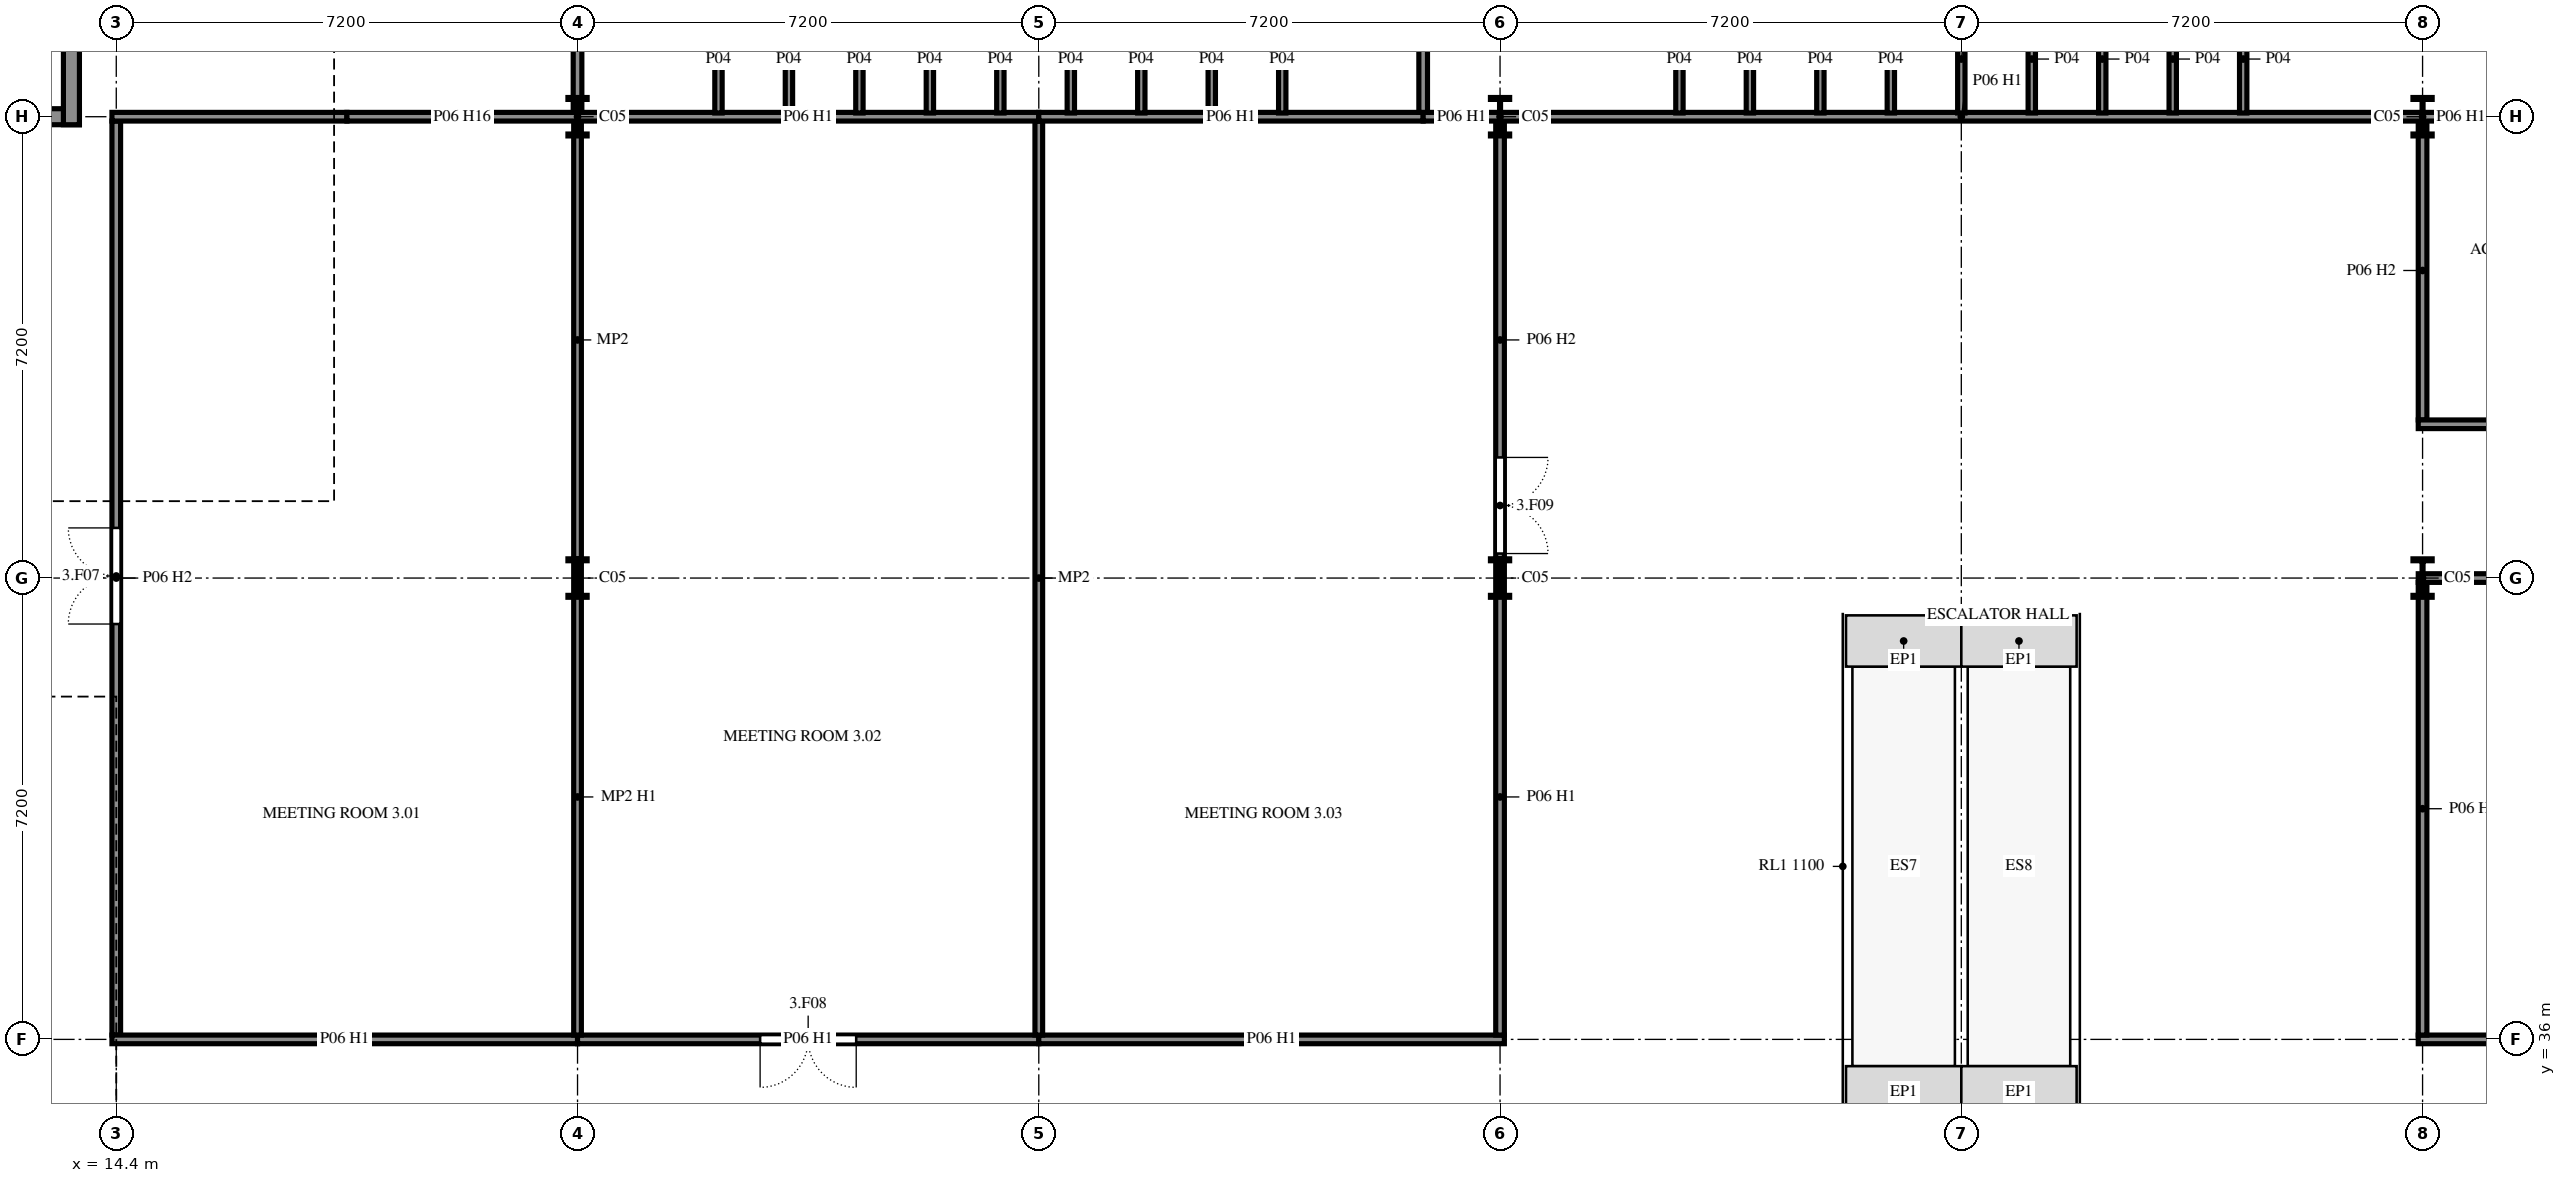
"""IFC4 building model, lengths in metres.
Left out: names, types, materials, properties, quantities, classifications, styles, units other than length and angle.
Written with IfcOpenShell. Run it as: python <this file> out.ifc"""

import sys

from ifc_helpers import new_model, si_unit, direction, frame, frame_2d, origin, origin_2d, place, context, subcontext, project, spatial, rectangle, i_section, extrude, element, fill, save


model = new_model("IFC4")
c1 = context("Model", 3, precision=1e-05, world=origin(), true_north=direction((0.0, 1.0)))
c2 = subcontext(c1, "Body", "Model", "MODEL_VIEW")
j1 = project(units=[si_unit("LENGTHUNIT", "METRE"), si_unit("PLANEANGLEUNIT", "RADIAN")], contexts=[c1])
p1 = place(None, origin())
s1 = spatial("IfcSite", under=j1, at=p1, CompositionType="ELEMENT")
p2 = place(p1, origin())
s2 = spatial("IfcBuilding", under=s1, at=p2, CompositionType="ELEMENT")
p3 = place(p2, frame((0.0, 0.0, 10.8)))
s3 = spatial("IfcBuildingStorey", under=s2, at=p3, CompositionType="ELEMENT", Elevation=10.8)
for number, where, z_axis, x_axis in (
    (1, (21.6, 43.2, 0.0), (0.0, 0.0, 1.0), (1.0, 0.0, 0.0)),
    (2, (21.6, 50.4, 0.0), (0.0, 0.0, 1.0), (1.0, 0.0, 0.0)),
    (3, (36.0, 43.2, 0.0), (0.0, 0.0, 1.0), (1.0, 0.0, 0.0)),
    (4, (36.0, 50.4, 0.0), (0.0, 0.0, 1.0), (1.0, 0.0, 0.0)),
    (5, (50.4, 43.2, 0.0), (0.0, 0.0, 1.0), (1.0, 0.0, 0.0)),
    (6, (50.4, 50.4, 0.0), (0.0, 0.0, 1.0), (1.0, 0.0, 0.0)),
):
    element("IfcColumn", number, at=place(p3, frame(where, z_axis=z_axis, x_axis=x_axis)), inside=s3, PredefinedType="COLUMN", context=c2, shape_type="SweptSolid", body=[
        extrude(i_section(OverallWidth=0.3, OverallDepth=0.6, WebThickness=0.015, FlangeThickness=0.03, FilletRadius=0.027, at=origin_2d()), origin(), (0.0, 0.0, 1.0), 3.6),
    ])
p4 = place(p3, frame((11.725, 50.4, 0.0), z_axis=(0.0, 0.0, 1.0), x_axis=(1.0, 0.0, 0.0)))
e7 = element("IfcWall", 7, at=p4, inside=s3, PredefinedType="SHEAR", context=c2, shape_type="SweptSolid", body=[
    extrude(rectangle(XDim=2.1, YDim=0.25, at=frame_2d((1.05, 0.0))), origin(), (0.0, 0.0, 1.0), 3.6),
])
p5 = place(p3, frame((13.7, 50.275, 0.0), z_axis=(0.0, 0.0, 1.0), x_axis=(0.0, 1.0, 0.0)))
e8 = element("IfcWall", 8, at=p5, inside=s3, PredefinedType="SHEAR", context=c2, shape_type="SweptSolid", body=[
    extrude(rectangle(XDim=5.25, YDim=0.25, at=frame_2d((2.625, 0.0))), origin(), (0.0, 0.0, 1.0), 3.6),
])
p6 = place(p5, frame((1.975, 0.0, 0.0)))
e9 = element("IfcOpeningElement", 9, at=p6, cuts=e8, PredefinedType="OPENING", context=c2, shape_type="SweptSolid", body=[
    extrude(rectangle(XDim=1.2, YDim=2.4, at=frame_2d((0.6, 1.2))), frame((0.0, 0.135, 0.0), z_axis=(0.0, -1.0, 0.0), x_axis=(1.0, 0.0, 0.0)), (0.0, 0.0, 1.0), 0.27),
])
p7 = place(p3, frame((14.4, 50.333, 0.0), z_axis=(0.0, 0.0, 1.0), x_axis=(0.0, -1.0, 0.0)))
e10 = element("IfcWall", 10, at=p7, inside=s3, PredefinedType="PARTITIONING", context=c2, shape_type="SweptSolid", body=[
    extrude(rectangle(XDim=14.265, YDim=0.135, at=frame_2d((7.133, 0.0))), origin(), (0.0, 0.0, 1.0), 3.12),
])
p8 = place(p7, frame((6.35, 0.0, 0.0)))
e11 = element("IfcOpeningElement", 11, at=p8, cuts=e10, PredefinedType="OPENING", context=c2, shape_type="SweptSolid", body=[
    extrude(rectangle(XDim=1.5, YDim=2.1, at=frame_2d((0.75, 1.05))), frame((0.0, 0.077, 0.0), z_axis=(0.0, -1.0, 0.0), x_axis=(1.0, 0.0, 0.0)), (0.0, 0.0, 1.0), 0.155),
])
p9 = place(p3, frame((18.0, 50.4, 0.0), z_axis=(0.0, 0.0, 1.0), x_axis=(-1.0, 0.0, 0.0)))
e12 = element("IfcWall", 12, at=p9, inside=s3, PredefinedType="PARTITIONING", context=c2, shape_type="SweptSolid", body=[
    extrude(rectangle(XDim=3.667, YDim=0.135, at=frame_2d((1.834, 0.0))), origin(), (0.0, 0.0, 1.0), 3.09),
])
p10 = place(p3, frame((14.333, 36.0, 0.0), z_axis=(0.0, 0.0, 1.0), x_axis=(1.0, 0.0, 0.0)))
e13 = element("IfcWall", 13, at=p10, inside=s3, PredefinedType="PARTITIONING", context=c2, shape_type="SweptSolid", body=[
    extrude(rectangle(XDim=7.268, YDim=0.135, at=frame_2d((3.634, 0.0))), origin(), (0.0, 0.0, 1.0), 2.82),
])
p11 = place(p3, frame((21.6, 36.0, 0.0), z_axis=(0.0, 0.0, 1.0), x_axis=(1.0, 0.0, 0.0)))
e14 = element("IfcWall", 14, at=p11, inside=s3, PredefinedType="PARTITIONING", context=c2, shape_type="SweptSolid", body=[
    extrude(rectangle(XDim=7.2, YDim=0.135, at=frame_2d((3.6, 0.0))), origin(), (0.0, 0.0, 1.0), 2.82),
])
p12 = place(p11, frame((2.85, 0.0, 0.0)))
e15 = element("IfcOpeningElement", 15, at=p12, cuts=e14, PredefinedType="OPENING", context=c2, shape_type="SweptSolid", body=[
    extrude(rectangle(XDim=1.5, YDim=2.1, at=frame_2d((0.75, 1.05))), frame((0.0, 0.077, 0.0), z_axis=(0.0, -1.0, 0.0), x_axis=(1.0, 0.0, 0.0)), (0.0, 0.0, 1.0), 0.155),
])
p13 = place(p3, frame((28.8, 36.0, 0.0), z_axis=(0.0, 0.0, 1.0), x_axis=(1.0, 0.0, 0.0)))
e16 = element("IfcWall", 16, at=p13, inside=s3, PredefinedType="PARTITIONING", context=c2, shape_type="SweptSolid", body=[
    extrude(rectangle(XDim=7.267, YDim=0.135, at=frame_2d((3.634, 0.0))), origin(), (0.0, 0.0, 1.0), 2.82),
])
p14 = place(p3, frame((50.333, 36.0, 0.0), z_axis=(0.0, 0.0, 1.0), x_axis=(1.0, 0.0, 0.0)))
e17 = element("IfcWall", 17, at=p14, inside=s3, PredefinedType="PARTITIONING", context=c2, shape_type="SweptSolid", body=[
    extrude(rectangle(XDim=7.268, YDim=0.135, at=frame_2d((3.634, 0.0))), origin(), (0.0, 0.0, 1.0), 2.82),
])
p15 = place(p14, frame((3.15, 0.0, 0.0)))
e18 = element("IfcOpeningElement", 18, at=p15, cuts=e17, PredefinedType="OPENING", context=c2, shape_type="SweptSolid", body=[
    extrude(rectangle(XDim=1.0, YDim=2.4, at=frame_2d((0.5, 1.2))), frame((0.0, 0.077, 0.0), z_axis=(0.0, -1.0, 0.0), x_axis=(1.0, 0.0, 0.0)), (0.0, 0.0, 1.0), 0.155),
])
p16 = place(p3, frame((21.6, 50.333, 0.0), z_axis=(0.0, 0.0, 1.0), x_axis=(0.0, -1.0, 0.0)))
e19 = element("IfcWall", 19, at=p16, inside=s3, PredefinedType="MOVABLE", context=c2, shape_type="SweptSolid", body=[
    extrude(rectangle(XDim=6.833, YDim=0.12, at=frame_2d((3.416, 0.0))), origin(), (0.0, 0.0, 1.0), 3.12),
])
p17 = place(p3, frame((18.0, 50.4, 0.0), z_axis=(0.0, 0.0, 1.0), x_axis=(1.0, 0.0, 0.0)))
e20 = element("IfcWall", 20, at=p17, inside=s3, PredefinedType="PARTITIONING", context=c2, shape_type="SweptSolid", body=[
    extrude(rectangle(XDim=3.6, YDim=0.135, at=frame_2d((1.8, 0.0))), origin(), (0.0, 0.0, 1.0), 3.09),
])
p18 = place(p3, frame((28.8, 50.333, 0.0), z_axis=(0.0, 0.0, 1.0), x_axis=(0.0, -1.0, 0.0)))
e21 = element("IfcWall", 21, at=p18, inside=s3, PredefinedType="MOVABLE", context=c2, shape_type="SweptSolid", body=[
    extrude(rectangle(XDim=14.265, YDim=0.12, at=frame_2d((7.133, 0.0))), origin(), (0.0, 0.0, 1.0), 3.12),
])
p19 = place(p3, frame((21.6, 50.4, 0.0), z_axis=(0.0, 0.0, 1.0), x_axis=(1.0, 0.0, 0.0)))
e22 = element("IfcWall", 22, at=p19, inside=s3, PredefinedType="PARTITIONING", context=c2, shape_type="SweptSolid", body=[
    extrude(rectangle(XDim=7.2, YDim=0.135, at=frame_2d((3.6, 0.0))), origin(), (0.0, 0.0, 1.0), 2.82),
])
p20 = place(p3, frame((36.0, 50.333, 0.0), z_axis=(0.0, 0.0, 1.0), x_axis=(0.0, -1.0, 0.0)))
e23 = element("IfcWall", 23, at=p20, inside=s3, PredefinedType="PARTITIONING", context=c2, shape_type="SweptSolid", body=[
    extrude(rectangle(XDim=6.833, YDim=0.135, at=frame_2d((3.416, 0.0))), origin(), (0.0, 0.0, 1.0), 3.12),
])
p21 = place(p20, frame((5.25, 0.0, 0.0)))
e24 = element("IfcOpeningElement", 24, at=p21, cuts=e23, PredefinedType="OPENING", context=c2, shape_type="SweptSolid", body=[
    extrude(rectangle(XDim=1.5, YDim=2.1, at=frame_2d((0.75, 1.05))), frame((0.0, 0.077, 0.0), z_axis=(0.0, -1.0, 0.0), x_axis=(1.0, 0.0, 0.0)), (0.0, 0.0, 1.0), 0.155),
])
p22 = place(p3, frame((28.8, 50.4, 0.0), z_axis=(0.0, 0.0, 1.0), x_axis=(1.0, 0.0, 0.0)))
e25 = element("IfcWall", 25, at=p22, inside=s3, PredefinedType="PARTITIONING", context=c2, shape_type="SweptSolid", body=[
    extrude(rectangle(XDim=6.0, YDim=0.135, at=frame_2d((3.0, 0.0))), origin(), (0.0, 0.0, 1.0), 2.82),
])
p23 = place(p3, frame((34.8, 50.4, 0.0), z_axis=(0.0, 0.0, 1.0), x_axis=(1.0, 0.0, 0.0)))
e26 = element("IfcWall", 26, at=p23, inside=s3, PredefinedType="PARTITIONING", context=c2, shape_type="SweptSolid", body=[
    extrude(rectangle(XDim=1.2, YDim=0.135, at=frame_2d((0.6, 0.0))), origin(), (0.0, 0.0, 1.0), 2.82),
])
p24 = place(p3, frame((50.4, 43.133, 0.0), z_axis=(0.0, 0.0, 1.0), x_axis=(0.0, -1.0, 0.0)))
e27 = element("IfcWall", 27, at=p24, inside=s3, PredefinedType="PARTITIONING", context=c2, shape_type="SweptSolid", body=[
    extrude(rectangle(XDim=7.065, YDim=0.135, at=frame_2d((3.533, 0.0))), origin(), (0.0, 0.0, 1.0), 2.82),
])
p25 = place(p3, frame((50.4, 50.333, 0.0), z_axis=(0.0, 0.0, 1.0), x_axis=(0.0, -1.0, 0.0)))
e28 = element("IfcWall", 28, at=p25, inside=s3, PredefinedType="PARTITIONING", context=c2, shape_type="SweptSolid", body=[
    extrude(rectangle(XDim=4.665, YDim=0.135, at=frame_2d((2.333, 0.0))), origin(), (0.0, 0.0, 1.0), 3.12),
])
p26 = place(p3, frame((36.0, 50.4, 0.0), z_axis=(0.0, 0.0, 1.0), x_axis=(1.0, 0.0, 0.0)))
e29 = element("IfcWall", 29, at=p26, inside=s3, PredefinedType="PARTITIONING", context=c2, shape_type="SweptSolid", body=[
    extrude(rectangle(XDim=14.4, YDim=0.135, at=frame_2d((7.2, 0.0))), origin(), (0.0, 0.0, 1.0), 2.82),
])
p27 = place(p3, frame((50.333, 43.2, 0.0), z_axis=(0.0, 0.0, 1.0), x_axis=(1.0, 0.0, 0.0)))
e30 = element("IfcWall", 30, at=p27, inside=s3, PredefinedType="PARTITIONING", context=c2, shape_type="SweptSolid", body=[
    extrude(rectangle(XDim=7.268, YDim=0.135, at=frame_2d((3.634, 0.0))), origin(), (0.0, 0.0, 1.0), 2.82),
])
p28 = place(p3, frame((50.333, 45.6, 0.0), z_axis=(0.0, 0.0, 1.0), x_axis=(1.0, 0.0, 0.0)))
e31 = element("IfcWall", 31, at=p28, inside=s3, PredefinedType="PARTITIONING", context=c2, shape_type="SweptSolid", body=[
    extrude(rectangle(XDim=7.268, YDim=0.135, at=frame_2d((3.634, 0.0))), origin(), (0.0, 0.0, 1.0), 3.42),
])
p29 = place(p28, frame((3.15, 0.0, 0.0)))
e32 = element("IfcOpeningElement", 32, at=p29, cuts=e31, PredefinedType="OPENING", context=c2, shape_type="SweptSolid", body=[
    extrude(rectangle(XDim=1.0, YDim=2.4, at=frame_2d((0.5, 1.2))), frame((0.0, 0.077, 0.0), z_axis=(0.0, -1.0, 0.0), x_axis=(1.0, 0.0, 0.0)), (0.0, 0.0, 1.0), 0.155),
])
p30 = place(p3, frame((50.4, 50.4, 0.0), z_axis=(0.0, 0.0, 1.0), x_axis=(1.0, 0.0, 0.0)))
e33 = element("IfcWall", 33, at=p30, inside=s3, PredefinedType="PARTITIONING", context=c2, shape_type="SweptSolid", body=[
    extrude(rectangle(XDim=1.2, YDim=0.135, at=frame_2d((0.6, 0.0))), origin(), (0.0, 0.0, 1.0), 2.82),
])
p31 = place(p3, frame((34.8, 58.133, 0.0), z_axis=(0.0, 0.0, 1.0), x_axis=(0.0, -1.0, 0.0)))
e34 = element("IfcWall", 34, at=p31, inside=s3, PredefinedType="PARTITIONING", context=c2, shape_type="SweptSolid", body=[
    extrude(rectangle(XDim=7.665, YDim=0.135, at=frame_2d((3.833, 0.0))), origin(), (0.0, 0.0, 1.0), 3.42),
])
p32 = place(p3, frame((21.6, 50.468, 0.0), z_axis=(0.0, 0.0, 1.0), x_axis=(0.0, 1.0, 0.0)))
e35 = element("IfcWall", 35, at=p32, inside=s3, PredefinedType="PARTITIONING", context=c2, shape_type="SweptSolid", body=[
    extrude(rectangle(XDim=7.665, YDim=0.135, at=frame_2d((3.833, 0.0))), origin(), (0.0, 0.0, 1.0), 2.42),
])
for number, where, z_axis, x_axis in (
    (36, (23.8, 50.458, 0.0), (0.0, 0.0, 1.0), (0.0, 1.0, 0.0)),
    (37, (24.9, 50.458, 0.0), (0.0, 0.0, 1.0), (0.0, 1.0, 0.0)),
    (38, (26.0, 50.458, 0.0), (0.0, 0.0, 1.0), (0.0, 1.0, 0.0)),
    (39, (27.1, 50.458, 0.0), (0.0, 0.0, 1.0), (0.0, 1.0, 0.0)),
    (40, (28.2, 50.458, 0.0), (0.0, 0.0, 1.0), (0.0, 1.0, 0.0)),
    (41, (29.3, 50.458, 0.0), (0.0, 0.0, 1.0), (0.0, 1.0, 0.0)),
    (42, (30.4, 50.458, 0.0), (0.0, 0.0, 1.0), (0.0, 1.0, 0.0)),
    (43, (31.5, 50.458, 0.0), (0.0, 0.0, 1.0), (0.0, 1.0, 0.0)),
    (44, (32.6, 50.458, 0.0), (0.0, 0.0, 1.0), (0.0, 1.0, 0.0)),
    (45, (38.8, 50.458, 0.0), (0.0, 0.0, 1.0), (0.0, 1.0, 0.0)),
    (46, (39.9, 50.458, 0.0), (0.0, 0.0, 1.0), (0.0, 1.0, 0.0)),
    (47, (41.0, 50.458, 0.0), (0.0, 0.0, 1.0), (0.0, 1.0, 0.0)),
    (48, (42.1, 50.458, 0.0), (0.0, 0.0, 1.0), (0.0, 1.0, 0.0)),
):
    element("IfcWall", number, at=place(p3, frame(where, z_axis=z_axis, x_axis=x_axis)), inside=s3, PredefinedType="PARTITIONING", context=c2, shape_type="SweptSolid", body=[
        extrude(rectangle(XDim=1.685, YDim=0.115, at=frame_2d((0.843, 0.0))), origin(), (0.0, 0.0, 1.0), 3.42),
    ])
p33 = place(p3, frame((43.2, 50.458, 0.0), z_axis=(0.0, 0.0, 1.0), x_axis=(0.0, 1.0, 0.0)))
e49 = element("IfcWall", 49, at=p33, inside=s3, PredefinedType="PARTITIONING", context=c2, shape_type="SweptSolid", body=[
    extrude(rectangle(XDim=1.685, YDim=0.115, at=frame_2d((0.843, 0.0))), origin(), (0.0, 0.0, 1.0), 3.12),
])
for number, where, z_axis, x_axis in (
    (50, (44.3, 50.458, 0.0), (0.0, 0.0, 1.0), (0.0, 1.0, 0.0)),
    (51, (45.4, 50.458, 0.0), (0.0, 0.0, 1.0), (0.0, 1.0, 0.0)),
    (52, (46.5, 50.458, 0.0), (0.0, 0.0, 1.0), (0.0, 1.0, 0.0)),
    (53, (47.6, 50.458, 0.0), (0.0, 0.0, 1.0), (0.0, 1.0, 0.0)),
):
    element("IfcWall", number, at=place(p3, frame(where, z_axis=z_axis, x_axis=x_axis)), inside=s3, PredefinedType="PARTITIONING", context=c2, shape_type="SweptSolid", body=[
        extrude(rectangle(XDim=1.685, YDim=0.115, at=frame_2d((0.843, 0.0))), origin(), (0.0, 0.0, 1.0), 3.42),
    ])
p34 = place(p3, frame((21.6, 43.5, 0.0), z_axis=(0.0, 0.0, 1.0), x_axis=(0.0, -1.0, 0.0)))
e54 = element("IfcWall", 54, at=p34, inside=s3, PredefinedType="MOVABLE", context=c2, shape_type="SweptSolid", body=[
    extrude(rectangle(XDim=7.433, YDim=0.12, at=frame_2d((3.716, 0.0))), origin(), (0.0, 0.0, 1.0), 2.82),
])
p35 = place(p3, frame((36.0, 43.5, 0.0), z_axis=(0.0, 0.0, 1.0), x_axis=(0.0, -1.0, 0.0)))
e55 = element("IfcWall", 55, at=p35, inside=s3, PredefinedType="PARTITIONING", context=c2, shape_type="SweptSolid", body=[
    extrude(rectangle(XDim=7.433, YDim=0.135, at=frame_2d((3.716, 0.0))), origin(), (0.0, 0.0, 1.0), 2.82),
])
p36 = place(p8, frame((1.5, 0.0, 0.0), z_axis=(0.0, 0.0, 1.0), x_axis=(-1.0, 0.0, 0.0)))
e56 = element("IfcDoor", 56, at=p36, inside=s3, OperationType="DOUBLE_DOOR_SINGLE_SWING", PredefinedType="DOOR", context=c2, shape_type="SweptSolid", body=[
    extrude(rectangle(XDim=1.5, YDim=2.1, at=frame_2d((0.75, 1.05))), frame((0.0, 0.025, 0.0), z_axis=(0.0, -1.0, 0.0), x_axis=(1.0, 0.0, 0.0)), (0.0, 0.0, 1.0), 0.05),
])
fill(e11, e56)
p37 = place(p12, frame((1.5, 0.0, 0.0), z_axis=(0.0, 0.0, 1.0), x_axis=(-1.0, 0.0, 0.0)))
e57 = element("IfcDoor", 57, at=p37, inside=s3, OperationType="DOUBLE_DOOR_SINGLE_SWING", PredefinedType="DOOR", context=c2, shape_type="SweptSolid", body=[
    extrude(rectangle(XDim=1.5, YDim=2.1, at=frame_2d((0.75, 1.05))), frame((0.0, 0.025, 0.0), z_axis=(0.0, -1.0, 0.0), x_axis=(1.0, 0.0, 0.0)), (0.0, 0.0, 1.0), 0.05),
])
fill(e15, e57)
p38 = place(p21, origin())
e58 = element("IfcDoor", 58, at=p38, inside=s3, OperationType="DOUBLE_DOOR_SINGLE_SWING", PredefinedType="DOOR", context=c2, shape_type="SweptSolid", body=[
    extrude(rectangle(XDim=1.5, YDim=2.1, at=frame_2d((0.75, 1.05))), frame((0.0, 0.025, 0.0), z_axis=(0.0, -1.0, 0.0), x_axis=(1.0, 0.0, 0.0)), (0.0, 0.0, 1.0), 0.05),
])
fill(e24, e58)
save(model, sys.argv[1])
